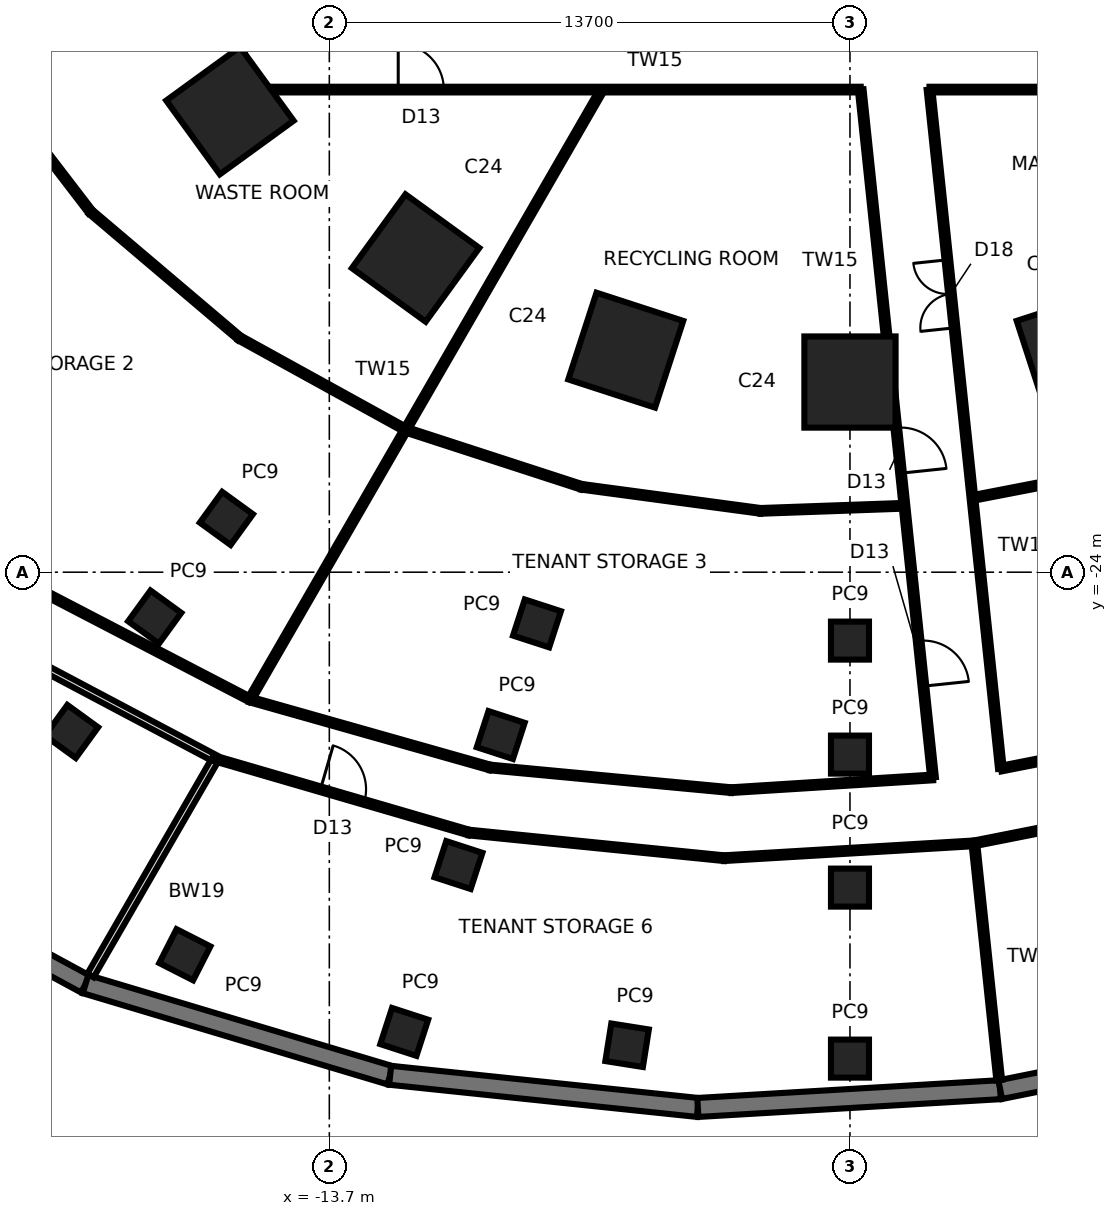
"""IFC4 building model, lengths in metres.
Left out: names, types, materials, properties, quantities, classifications, styles, units other than length and angle.
Written with IfcOpenShell. Run it as: python <this file> out.ifc"""

import sys

from ifc_helpers import new_model, si_unit, direction, frame, frame_2d, origin, origin_2d, place, context, subcontext, project, spatial, rectangle, extrude, element, fill, save


model = new_model("IFC4")
c1 = context("Model", 3, precision=1e-05, world=origin(), true_north=direction((0.0, 1.0)))
c2 = subcontext(c1, "Body", "Model", "MODEL_VIEW")
j1 = project(units=[si_unit("LENGTHUNIT", "METRE"), si_unit("PLANEANGLEUNIT", "RADIAN")], contexts=[c1])
p1 = place(None, origin())
s1 = spatial("IfcSite", under=j1, at=p1, CompositionType="ELEMENT")
p2 = place(p1, origin())
s2 = spatial("IfcBuilding", under=s1, at=p2, CompositionType="ELEMENT")
p3 = place(p2, frame((0.0, 0.0, -5.0)))
s3 = spatial("IfcBuildingStorey", under=s2, at=p3, CompositionType="ELEMENT", Elevation=-5.0)
p4 = place(p3, frame((-27.677, -30.739, -0.15), z_axis=(0.0, 0.0, 1.0), x_axis=(0.879050198661, -0.476729218986, 0.0)))
e1 = element("IfcWall", 1, at=p4, inside=s3, PredefinedType="SOLIDWALL", context=c2, shape_type="SweptSolid", body=[
    extrude(rectangle(XDim=8.603, YDim=0.5, at=frame_2d((4.302, 0.0))), origin(), (0.0, 0.0, 1.0), 4.95),
])
p5 = place(p3, frame((-20.115, -34.84, -0.15), z_axis=(0.0, 0.0, 1.0), x_axis=(0.958018826272, -0.286705299059, 0.0)))
e2 = element("IfcWall", 2, at=p5, inside=s3, PredefinedType="SOLIDWALL", context=c2, shape_type="SweptSolid", body=[
    extrude(rectangle(XDim=8.366, YDim=0.5, at=frame_2d((4.183, 0.0))), origin(), (0.0, 0.0, 1.0), 4.95),
])
p6 = place(p3, frame((-12.1, -37.239, -0.15), z_axis=(0.0, 0.0, 1.0), x_axis=(0.994576866519, -0.104004118113, 0.0)))
e3 = element("IfcWall", 3, at=p6, inside=s3, PredefinedType="SOLIDWALL", context=c2, shape_type="SweptSolid", body=[
    extrude(rectangle(XDim=8.141, YDim=0.5, at=frame_2d((4.07, 0.0))), origin(), (0.0, 0.0, 1.0), 4.95),
])
p7 = place(p3, frame((-4.003, -38.085, -0.15), z_axis=(0.0, 0.0, 1.0), x_axis=(0.998274478799, 0.058720226323, 0.0)))
e4 = element("IfcWall", 4, at=p7, inside=s3, PredefinedType="SOLIDWALL", context=c2, shape_type="SweptSolid", body=[
    extrude(rectangle(XDim=7.97, YDim=0.5, at=frame_2d((3.985, 0.0))), origin(), (0.0, 0.0, 1.0), 4.95),
])
p8 = place(p3, frame((3.954, -37.617, -0.15), z_axis=(0.0, 0.0, 1.0), x_axis=(0.980279440506, 0.197616341736, 0.0)))
e5 = element("IfcWall", 5, at=p8, inside=s3, PredefinedType="SOLIDWALL", context=c2, shape_type="SweptSolid", body=[
    extrude(rectangle(XDim=7.917, YDim=0.5, at=frame_2d((3.958, 0.0))), origin(), (0.0, 0.0, 1.0), 4.95),
])
for number, where, z_axis, x_axis in (
    (6, (-16.315, -11.854, -0.15), (0.0, 0.0, 1.0), (-0.809, -0.588, 0.0)),
    (7, (-11.43, -15.733, -0.15), (0.0, 0.0, 1.0), (-0.588, -0.809, 0.0)),
    (8, (-5.9, -18.157, -0.15), (0.0, 0.0, 1.0), (-0.309, -0.951, 0.0)),
    (9, (0.0, -18.996, -0.15), (0.0, 0.0, 1.0), (0.0, -1.0, 0.0)),
    (10, (5.9, -18.157, -0.15), (0.0, 0.0, 1.0), (0.309, -0.951, 0.0)),
):
    element("IfcColumn", number, at=place(p3, frame(where, z_axis=z_axis, x_axis=x_axis)), inside=s3, PredefinedType="COLUMN", context=c2, shape_type="SweptSolid", body=[
        extrude(rectangle(XDim=2.4, YDim=2.4, at=origin_2d()), origin(), (0.0, 0.0, 1.0), 5.15),
    ])
for number, where, z_axis, x_axis in (
    (11, (-17.502, -34.066, -0.15), (0.0, 0.0, 1.0), (-0.454, -0.891, 0.0)),
    (12, (-11.729, -36.097, -0.15), (0.0, 0.0, 1.0), (-0.309, -0.951, 0.0)),
    (13, (-5.864, -36.449, -0.15), (0.0, 0.0, 1.0), (-0.156, -0.988, 0.0)),
    (14, (0.0, -36.8, -0.15), (0.0, 0.0, 1.0), (0.0, -1.0, 0.0)),
    (15, (-20.483, -28.192, -0.15), (0.0, 0.0, 1.0), (-0.588, -0.809, 0.0)),
    (16, (-10.302, -31.706, -0.15), (0.0, 0.0, 1.0), (-0.309, -0.951, 0.0)),
    (17, (0.0, -32.3, -0.15), (0.0, 0.0, 1.0), (0.0, -1.0, 0.0)),
    (18, (-18.294, -25.18, -0.15), (0.0, 0.0, 1.0), (-0.588, -0.809, 0.0)),
    (19, (-9.19, -28.285, -0.15), (0.0, 0.0, 1.0), (-0.309, -0.951, 0.0)),
    (20, (0.0, -28.8, -0.15), (0.0, 0.0, 1.0), (0.0, -1.0, 0.0)),
    (21, (-16.409, -22.584, -0.15), (0.0, 0.0, 1.0), (-0.588, -0.809, 0.0)),
    (22, (-8.236, -25.347, -0.15), (0.0, 0.0, 1.0), (-0.309, -0.951, 0.0)),
    (23, (0.0, -25.8, -0.15), (0.0, 0.0, 1.0), (0.0, -1.0, 0.0)),
):
    element("IfcColumn", number, at=place(p3, frame(where, z_axis=z_axis, x_axis=x_axis)), inside=s3, PredefinedType="COLUMN", context=c2, shape_type="SweptSolid", body=[
        extrude(rectangle(XDim=1.0, YDim=1.0, at=origin_2d()), origin(), (0.0, 0.0, 1.0), 5.15),
    ])
p9 = place(p3, frame((-16.0, 2.481, 0.0), z_axis=(0.0, 0.0, 1.0), x_axis=(0.0, -1.0, 0.0)))
e24 = element("IfcWall", 24, at=p9, inside=s3, PredefinedType="PARTITIONING", context=c2, shape_type="SweptSolid", body=[
    extrude(rectangle(XDim=13.781, YDim=0.15, at=frame_2d((6.89, 0.0))), origin(), (0.0, 0.0, 1.0), 4.8),
])
p10 = place(p9, frame((7.143, 0.0, 0.0)))
e25 = element("IfcOpeningElement", 25, at=p10, cuts=e24, PredefinedType="OPENING", context=c2, shape_type="SweptSolid", body=[
    extrude(rectangle(XDim=1.2, YDim=2.1, at=frame_2d((0.6, 1.05))), frame((0.0, 0.085, 0.0), z_axis=(0.0, -1.0, 0.0), x_axis=(1.0, 0.0, 0.0)), (0.0, 0.0, 1.0), 0.17),
])
p11 = place(p3, frame((-16.0, -7.124, 0.0), z_axis=(0.0, 0.0, 1.0), x_axis=(-0.913549946031, -0.40672656184, 0.0)))
e26 = element("IfcWall", 26, at=p11, inside=s3, PredefinedType="PARTITIONING", context=c2, shape_type="SweptSolid", body=[
    extrude(rectangle(XDim=16.868, YDim=0.15, at=frame_2d((8.434, 0.0))), origin(), (0.0, 0.0, 1.0), 4.8),
])
p12 = place(p3, frame((-19.98, -14.516, 0.0), z_axis=(0.0, 0.0, 1.0), x_axis=(-0.608481047622, 0.793568405801, 0.0)))
e27 = element("IfcWall", 27, at=p12, inside=s3, PredefinedType="PARTITIONING", context=c2, shape_type="SweptSolid", body=[
    extrude(rectangle(XDim=5.28, YDim=0.15, at=frame_2d((2.64, 0.0))), origin(), (0.0, 0.0, 1.0), 4.8),
])
p13 = place(p3, frame((-16.062, -17.839, 0.0), z_axis=(0.0, 0.0, 1.0), x_axis=(-0.762708036384, 0.646742956077, 0.0)))
e28 = element("IfcWall", 28, at=p13, inside=s3, PredefinedType="PARTITIONING", context=c2, shape_type="SweptSolid", body=[
    extrude(rectangle(XDim=5.137, YDim=0.15, at=frame_2d((2.568, 0.0))), origin(), (0.0, 0.0, 1.0), 4.8),
])
p14 = place(p3, frame((-15.791, -27.35, 0.0), z_axis=(0.0, 0.0, 1.0), x_axis=(-0.887313425563, 0.461166873068, 0.0)))
e29 = element("IfcWall", 29, at=p14, inside=s3, PredefinedType="PARTITIONING", context=c2, shape_type="SweptSolid", body=[
    extrude(rectangle(XDim=6.783, YDim=0.15, at=frame_2d((3.392, 0.0))), origin(), (0.0, 0.0, 1.0), 4.8),
])
p15 = place(p3, frame((-23.014, -25.559, 0.0), z_axis=(0.0, 0.0, 1.0), x_axis=(0.883685814524, -0.468080528551, 0.0)))
e30 = element("IfcWall", 30, at=p15, inside=s3, PredefinedType="SOLIDWALL", context=c2, shape_type="SweptSolid", body=[
    extrude(rectangle(XDim=7.156, YDim=0.19, at=frame_2d((3.578, 0.0))), origin(), (0.0, 0.0, 1.0), 4.8),
])
p16 = place(p3, frame((-11.691, -20.25, 0.0), z_axis=(0.0, 0.0, 1.0), x_axis=(-0.875641162684, 0.482962269968, 0.0)))
e31 = element("IfcWall", 31, at=p16, inside=s3, PredefinedType="PARTITIONING", context=c2, shape_type="SweptSolid", body=[
    extrude(rectangle(XDim=4.992, YDim=0.15, at=frame_2d((2.496, 0.0))), origin(), (0.0, 0.0, 1.0), 4.8),
])
p17 = place(p3, frame((-16.0, -11.3, 0.0), z_axis=(0.0, 0.0, 1.0), x_axis=(1.0, 0.0, 0.0)))
e32 = element("IfcWall", 32, at=p17, inside=s3, PredefinedType="PARTITIONING", context=c2, shape_type="SweptSolid", body=[
    extrude(rectangle(XDim=16.283, YDim=0.15, at=frame_2d((8.141, 0.0))), origin(), (0.0, 0.0, 1.0), 4.8),
])
p18 = place(p17, frame((4.113, 0.0, 0.0)))
e33 = element("IfcOpeningElement", 33, at=p18, cuts=e32, PredefinedType="OPENING", context=c2, shape_type="SweptSolid", body=[
    extrude(rectangle(XDim=1.2, YDim=2.4, at=frame_2d((0.6, 1.2))), frame((0.0, 0.085, 0.0), z_axis=(0.0, -1.0, 0.0), x_axis=(1.0, 0.0, 0.0)), (0.0, 0.0, 1.0), 0.17),
])
p19 = place(p3, frame((-16.69, -28.909, 0.0), z_axis=(0.0, 0.0, 1.0), x_axis=(-0.5000047107, -0.866022684043, 0.0)))
e34 = element("IfcWall", 34, at=p19, inside=s3, PredefinedType="SOLIDWALL", context=c2, shape_type="SweptSolid", body=[
    extrude(rectangle(XDim=6.589, YDim=0.19, at=frame_2d((3.294, 0.0))), origin(), (0.0, 0.0, 1.0), 4.8),
])
p20 = place(p3, frame((-6.524, -11.3, 0.0), z_axis=(0.0, 0.0, 1.0), x_axis=(-0.499999933838, -0.866025441983, 0.0)))
e35 = element("IfcWall", 35, at=p20, inside=s3, PredefinedType="PARTITIONING", context=c2, shape_type="SweptSolid", body=[
    extrude(rectangle(XDim=18.533, YDim=0.15, at=frame_2d((9.266, 0.0))), origin(), (0.0, 0.0, 1.0), 4.8),
])
p21 = place(p3, frame((-9.468, -29.139, 0.0), z_axis=(0.0, 0.0, 1.0), x_axis=(-0.962199616319, 0.272345182362, 0.0)))
e36 = element("IfcWall", 36, at=p21, inside=s3, PredefinedType="PARTITIONING", context=c2, shape_type="SweptSolid", body=[
    extrude(rectangle(XDim=6.571, YDim=0.15, at=frame_2d((3.285, 0.0))), origin(), (0.0, 0.0, 1.0), 4.8),
])
p22 = place(p3, frame((-16.69, -28.909, 0.0), z_axis=(0.0, 0.0, 1.0), x_axis=(0.960065738287, -0.279774513076, 0.0)))
e37 = element("IfcWall", 37, at=p22, inside=s3, PredefinedType="PARTITIONING", context=c2, shape_type="SweptSolid", body=[
    extrude(rectangle(XDim=6.944, YDim=0.15, at=frame_2d((3.472, 0.0))), origin(), (0.0, 0.0, 1.0), 4.8),
])
p23 = place(p22, frame((2.872, 0.0, 0.0)))
e38 = element("IfcOpeningElement", 38, at=p23, cuts=e37, PredefinedType="OPENING", context=c2, shape_type="SweptSolid", body=[
    extrude(rectangle(XDim=1.2, YDim=2.4, at=frame_2d((0.6, 1.2))), frame((0.0, 0.085, 0.0), z_axis=(0.0, -1.0, 0.0), x_axis=(1.0, 0.0, 0.0)), (0.0, 0.0, 1.0), 0.17),
])
p24 = place(p3, frame((-7.068, -21.752, 0.0), z_axis=(0.0, 0.0, 1.0), x_axis=(-0.951027056342, 0.309107648085, 0.0)))
e39 = element("IfcWall", 39, at=p24, inside=s3, PredefinedType="PARTITIONING", context=c2, shape_type="SweptSolid", body=[
    extrude(rectangle(XDim=4.861, YDim=0.15, at=frame_2d((2.431, 0.0))), origin(), (0.0, 0.0, 1.0), 4.8),
])
p25 = place(p3, frame((-3.125, -29.735, 0.0), z_axis=(0.0, 0.0, 1.0), x_axis=(-0.995615062488, 0.093544894824, 0.0)))
e40 = element("IfcWall", 40, at=p25, inside=s3, PredefinedType="PARTITIONING", context=c2, shape_type="SweptSolid", body=[
    extrude(rectangle(XDim=6.371, YDim=0.15, at=frame_2d((3.185, 0.0))), origin(), (0.0, 0.0, 1.0), 4.8),
])
p26 = place(p3, frame((-10.024, -30.851, 0.0), z_axis=(0.0, 0.0, 1.0), x_axis=(0.994993009021, -0.099944544618, 0.0)))
e41 = element("IfcWall", 41, at=p26, inside=s3, PredefinedType="PARTITIONING", context=c2, shape_type="SweptSolid", body=[
    extrude(rectangle(XDim=6.744, YDim=0.15, at=frame_2d((3.372, 0.0))), origin(), (0.0, 0.0, 1.0), 4.8),
])
p27 = place(p3, frame((-2.353, -22.386, 0.0), z_axis=(0.0, 0.0, 1.0), x_axis=(-0.991085698144, 0.133225894386, 0.0)))
e42 = element("IfcWall", 42, at=p27, inside=s3, PredefinedType="PARTITIONING", context=c2, shape_type="SweptSolid", body=[
    extrude(rectangle(XDim=4.757, YDim=0.15, at=frame_2d((2.379, 0.0))), origin(), (0.0, 0.0, 1.0), 4.8),
])
p28 = place(p3, frame((1.434, -22.252, 0.0), z_axis=(0.0, 0.0, 1.0), x_axis=(-0.999374131302, -0.035374364802, 0.0)))
e43 = element("IfcWall", 43, at=p28, inside=s3, PredefinedType="PARTITIONING", context=c2, shape_type="SweptSolid", body=[
    extrude(rectangle(XDim=3.789, YDim=0.15, at=frame_2d((1.895, 0.0))), origin(), (0.0, 0.0, 1.0), 4.8),
])
p29 = place(p3, frame((2.185, -29.401, 0.0), z_axis=(0.0, 0.0, 1.0), x_axis=(-0.998022470295, -0.062858164045, 0.0)))
e44 = element("IfcWall", 44, at=p29, inside=s3, PredefinedType="PARTITIONING", context=c2, shape_type="SweptSolid", body=[
    extrude(rectangle(XDim=5.321, YDim=0.15, at=frame_2d((2.661, 0.0))), origin(), (0.0, 0.0, 1.0), 4.8),
])
p30 = place(p3, frame((-3.313, -31.525, 0.0), z_axis=(0.0, 0.0, 1.0), x_axis=(0.998243483958, 0.059244803448, 0.0)))
e45 = element("IfcWall", 45, at=p30, inside=s3, PredefinedType="PARTITIONING", context=c2, shape_type="SweptSolid", body=[
    extrude(rectangle(XDim=6.597, YDim=0.15, at=frame_2d((3.299, 0.0))), origin(), (0.0, 0.0, 1.0), 4.8),
])
p31 = place(p3, frame((0.283, -11.3, 0.0), z_axis=(0.0, 0.0, 1.0), x_axis=(0.104534657703, -0.994521244287, 0.0)))
e46 = element("IfcWall", 46, at=p31, inside=s3, PredefinedType="PARTITIONING", context=c2, shape_type="SweptSolid", body=[
    extrude(rectangle(XDim=18.2, YDim=0.15, at=frame_2d((9.1, 0.0))), origin(), (0.0, 0.0, 1.0), 4.8),
])
p32 = place(p31, frame((8.95, 0.0, 0.0)))
e47 = element("IfcOpeningElement", 47, at=p32, cuts=e46, PredefinedType="OPENING", context=c2, shape_type="SweptSolid", body=[
    extrude(rectangle(XDim=1.2, YDim=2.4, at=frame_2d((0.6, 1.2))), frame((0.0, 0.085, 0.0), z_axis=(0.0, -1.0, 0.0), x_axis=(1.0, 0.0, 0.0)), (0.0, 0.0, 1.0), 0.17),
])
p33 = place(p31, frame((14.586, 0.0, 0.0)))
e48 = element("IfcOpeningElement", 48, at=p33, cuts=e46, PredefinedType="OPENING", context=c2, shape_type="SweptSolid", body=[
    extrude(rectangle(XDim=1.2, YDim=2.4, at=frame_2d((0.6, 1.2))), frame((0.0, 0.085, 0.0), z_axis=(0.0, -1.0, 0.0), x_axis=(1.0, 0.0, 0.0)), (0.0, 0.0, 1.0), 0.17),
])
p34 = place(p3, frame((3.272, -31.135, 0.0), z_axis=(0.0, 0.0, 1.0), x_axis=(0.10452654069, -0.994522097437, 0.0)))
e49 = element("IfcWall", 49, at=p34, inside=s3, PredefinedType="PARTITIONING", context=c2, shape_type="SweptSolid", body=[
    extrude(rectangle(XDim=6.264, YDim=0.15, at=frame_2d((3.132, 0.0))), origin(), (0.0, 0.0, 1.0), 4.8),
])
p35 = place(p3, frame((3.971, -29.169, 0.0), z_axis=(0.0, 0.0, 1.0), x_axis=(-0.104531296456, 0.994521597584, 0.0)))
e50 = element("IfcWall", 50, at=p35, inside=s3, PredefinedType="PARTITIONING", context=c2, shape_type="SweptSolid", body=[
    extrude(rectangle(XDim=17.968, YDim=0.15, at=frame_2d((8.984, 0.0))), origin(), (0.0, 0.0, 1.0), 4.8),
])
p36 = place(p35, frame((11.664, 0.0, 0.0)))
e51 = element("IfcOpeningElement", 51, at=p36, cuts=e50, PredefinedType="OPENING", context=c2, shape_type="SweptSolid", body=[
    extrude(rectangle(XDim=1.8, YDim=2.4, at=frame_2d((0.9, 1.2))), frame((0.0, 0.085, 0.0), z_axis=(0.0, -1.0, 0.0), x_axis=(1.0, 0.0, 0.0)), (0.0, 0.0, 1.0), 0.17),
])
p37 = place(p3, frame((3.272, -31.135, 0.0), z_axis=(0.0, 0.0, 1.0), x_axis=(0.980908787451, 0.194468379696, 0.0)))
e52 = element("IfcWall", 52, at=p37, inside=s3, PredefinedType="PARTITIONING", context=c2, shape_type="SweptSolid", body=[
    extrude(rectangle(XDim=6.555, YDim=0.15, at=frame_2d((3.277, 0.0))), origin(), (0.0, 0.0, 1.0), 4.8),
])
p38 = place(p37, frame((2.402, 0.0, 0.0)))
e53 = element("IfcOpeningElement", 53, at=p38, cuts=e52, PredefinedType="OPENING", context=c2, shape_type="SweptSolid", body=[
    extrude(rectangle(XDim=1.8, YDim=2.4, at=frame_2d((0.9, 1.2))), frame((0.0, 0.085, 0.0), z_axis=(0.0, -1.0, 0.0), x_axis=(1.0, 0.0, 0.0)), (0.0, 0.0, 1.0), 0.17),
])
p39 = place(p3, frame((9.146, -28.148, 0.0), z_axis=(0.0, 0.0, 1.0), x_axis=(-0.98107946534, -0.193605482074, 0.0)))
e54 = element("IfcWall", 54, at=p39, inside=s3, PredefinedType="PARTITIONING", context=c2, shape_type="SweptSolid", body=[
    extrude(rectangle(XDim=5.275, YDim=0.15, at=frame_2d((2.637, 0.0))), origin(), (0.0, 0.0, 1.0), 4.8),
])
p40 = place(p3, frame((6.931, -21.331, 0.0), z_axis=(0.0, 0.0, 1.0), x_axis=(-0.981789574209, -0.189971660978, 0.0)))
e55 = element("IfcWall", 55, at=p40, inside=s3, PredefinedType="PARTITIONING", context=c2, shape_type="SweptSolid", body=[
    extrude(rectangle(XDim=3.777, YDim=0.15, at=frame_2d((1.889, 0.0))), origin(), (0.0, 0.0, 1.0), 4.8),
])
p41 = place(p3, frame((2.093, -11.3, 0.0), z_axis=(0.0, 0.0, 1.0), x_axis=(1.0, 0.0, 0.0)))
e56 = element("IfcWall", 56, at=p41, inside=s3, PredefinedType="PARTITIONING", context=c2, shape_type="SweptSolid", body=[
    extrude(rectangle(XDim=8.082, YDim=0.15, at=frame_2d((4.041, 0.0))), origin(), (0.0, 0.0, 1.0), 4.8),
])
p42 = place(p18, origin())
e57 = element("IfcDoor", 57, at=p42, inside=s3, OperationType="SINGLE_SWING_LEFT", PredefinedType="DOOR", context=c2, shape_type="SweptSolid", body=[
    extrude(rectangle(XDim=1.2, YDim=2.4, at=frame_2d((0.6, 1.2))), frame((0.0, 0.025, 0.0), z_axis=(0.0, -1.0, 0.0), x_axis=(1.0, 0.0, 0.0)), (0.0, 0.0, 1.0), 0.05),
])
fill(e33, e57)
p43 = place(p32, origin())
e58 = element("IfcDoor", 58, at=p43, inside=s3, OperationType="SINGLE_SWING_RIGHT", PredefinedType="DOOR", context=c2, shape_type="SweptSolid", body=[
    extrude(rectangle(XDim=1.2, YDim=2.4, at=frame_2d((0.6, 1.2))), frame((0.0, 0.025, 0.0), z_axis=(0.0, -1.0, 0.0), x_axis=(1.0, 0.0, 0.0)), (0.0, 0.0, 1.0), 0.05),
])
fill(e47, e58)
p44 = place(p36, origin())
e59 = element("IfcDoor", 59, at=p44, inside=s3, OperationType="DOUBLE_DOOR_SINGLE_SWING", PredefinedType="DOOR", context=c2, shape_type="SweptSolid", body=[
    extrude(rectangle(XDim=1.8, YDim=2.4, at=frame_2d((0.9, 1.2))), frame((0.0, 0.025, 0.0), z_axis=(0.0, -1.0, 0.0), x_axis=(1.0, 0.0, 0.0)), (0.0, 0.0, 1.0), 0.05),
])
fill(e51, e59)
p45 = place(p33, origin())
e60 = element("IfcDoor", 60, at=p45, inside=s3, OperationType="SINGLE_SWING_RIGHT", PredefinedType="DOOR", context=c2, shape_type="SweptSolid", body=[
    extrude(rectangle(XDim=1.2, YDim=2.4, at=frame_2d((0.6, 1.2))), frame((0.0, 0.025, 0.0), z_axis=(0.0, -1.0, 0.0), x_axis=(1.0, 0.0, 0.0)), (0.0, 0.0, 1.0), 0.05),
])
fill(e48, e60)
p46 = place(p23, origin())
e61 = element("IfcDoor", 61, at=p46, inside=s3, OperationType="SINGLE_SWING_LEFT", PredefinedType="DOOR", context=c2, shape_type="SweptSolid", body=[
    extrude(rectangle(XDim=1.2, YDim=2.4, at=frame_2d((0.6, 1.2))), frame((0.0, 0.025, 0.0), z_axis=(0.0, -1.0, 0.0), x_axis=(1.0, 0.0, 0.0)), (0.0, 0.0, 1.0), 0.05),
])
fill(e38, e61)
save(model, sys.argv[1])
